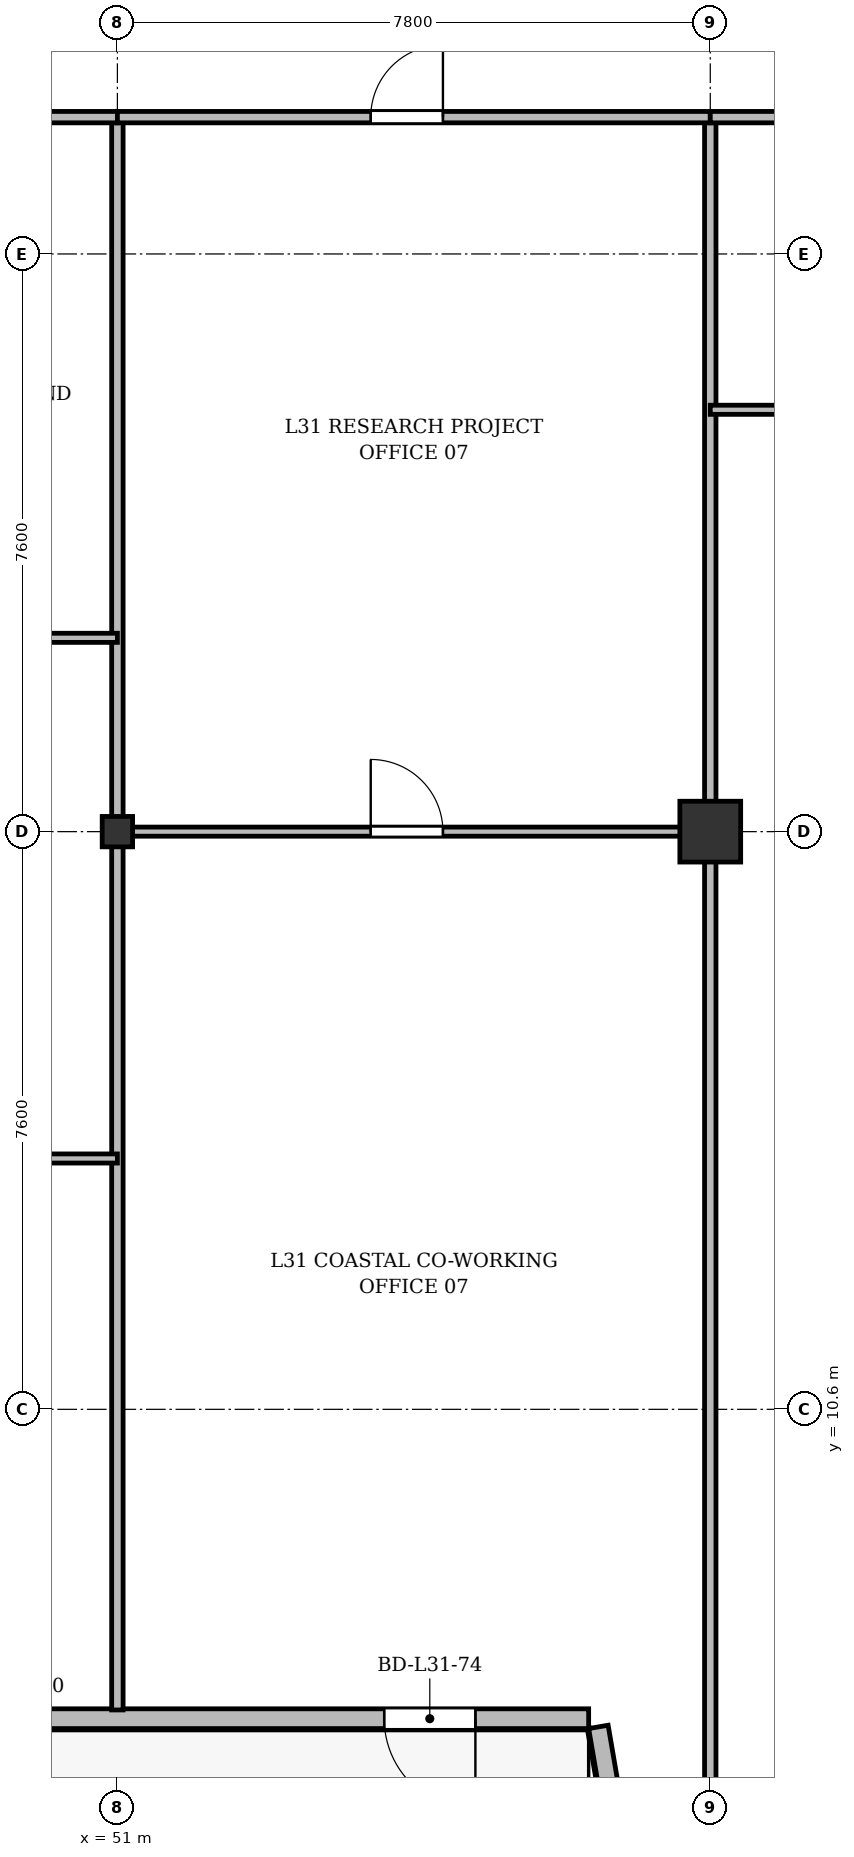
"""IFC4 building model, lengths in metres.
Left out: names, types, materials, properties, quantities, classifications, styles, units other than length and angle.
Written with IfcOpenShell. Run it as: python <this file> out.ifc"""

import sys

from ifc_helpers import new_model, si_unit, direction, frame, frame_2d, origin, origin_2d, place, context, subcontext, project, spatial, rectangle, i_section, extrude, source, transform, mapped, element, fill, save


model = new_model("IFC4")
c1 = context("Model", 3, precision=1e-05, world=origin(), true_north=direction((0.0, 1.0)))
c2 = subcontext(c1, "Body", "Model", "MODEL_VIEW")
j1 = project(units=[si_unit("LENGTHUNIT", "METRE"), si_unit("PLANEANGLEUNIT", "RADIAN")], contexts=[c1])
p1 = place(None, origin())
s1 = spatial("IfcSite", under=j1, at=p1, CompositionType="ELEMENT")
p2 = place(p1, origin())
s2 = spatial("IfcBuilding", under=s1, at=p2, CompositionType="ELEMENT")
p3 = place(p2, frame((0.0, 0.0, 121.3)))
s3 = spatial("IfcBuildingStorey", under=s2, at=p3, CompositionType="ELEMENT", Elevation=121.3)
m1 = source(origin(), c2, "Body", "SweptSolid", [
    extrude(i_section(OverallWidth=0.4, OverallDepth=0.4, WebThickness=0.022, FlangeThickness=0.035, at=origin_2d()), origin(), (0.0, 0.0, 1.0), 3.6),
])
p4 = place(p3, frame((51.0, 18.2, 0.0), z_axis=(0.0, 0.0, 1.0), x_axis=(1.0, 0.0, 0.0)))
e1 = element("IfcColumn", 1, at=p4, inside=s3, PredefinedType="COLUMN", context=c2, shape_type="MappedRepresentation", body=[
    mapped(m1, transform((0.0, 0.0, 0.0), x_axis=(1.0, 0.0, 0.0), y_axis=(0.0, 1.0, 0.0), z_axis=(0.0, 0.0, 1.0), scale=1.0)),
])
m2 = source(origin(), c2, "Body", "SweptSolid", [
    extrude(rectangle(XDim=0.8, YDim=0.8, at=origin_2d()), origin(), (0.0, 0.0, 1.0), 3.6),
])
p5 = place(p3, frame((58.8, 18.2, 0.0), z_axis=(0.0, 0.0, 1.0), x_axis=(1.0, 0.0, 0.0)))
e2 = element("IfcColumn", 2, at=p5, inside=s3, PredefinedType="COLUMN", context=c2, shape_type="MappedRepresentation", body=[
    mapped(m2, transform((0.0, 0.0, 0.0), x_axis=(1.0, 0.0, 0.0), y_axis=(0.0, 1.0, 0.0), z_axis=(0.0, 0.0, 1.0), scale=1.0)),
])
p6 = place(p3, frame((57.928, 2.922, 0.0), z_axis=(0.0, 0.0, 1.0), x_axis=(-0.168923741424, 0.98562912375, 0.0)))
e3 = element("IfcWall", 3, at=p6, inside=s3, PredefinedType="SOLIDWALL", context=c2, shape_type="SweptSolid", body=[
    extrude(rectangle(XDim=3.551, YDim=0.26, at=frame_2d((1.775, 0.0))), origin(), (0.0, 0.0, 1.0), 2.752),
])
p7 = place(p3, frame((57.2, 6.53, 0.0), z_axis=(0.0, 0.0, 1.0), x_axis=(-1.0, 0.0, 0.0)))
e4 = element("IfcWall", 4, at=p7, inside=s3, PredefinedType="SOLIDWALL", context=c2, shape_type="SweptSolid", body=[
    extrude(rectangle(XDim=11.8, YDim=0.26, at=frame_2d((5.9, 0.0))), origin(), (0.0, 0.0, 1.0), 2.84),
])
p8 = place(p7, frame((1.49, 0.0, 0.0)))
e5 = element("IfcOpeningElement", 5, at=p8, cuts=e4, PredefinedType="OPENING", context=c2, shape_type="SweptSolid", body=[
    extrude(rectangle(XDim=1.2, YDim=2.2, at=frame_2d((0.6, 1.1))), frame((0.0, 0.14, 0.0), z_axis=(0.0, -1.0, 0.0), x_axis=(1.0, 0.0, 0.0)), (0.0, 0.0, 1.0), 0.28),
])
p9 = place(p7, frame((7.25, 0.0, 0.9)))
e6 = element("IfcOpeningElement", 6, at=p9, cuts=e4, PredefinedType="OPENING", context=c2, shape_type="SweptSolid", body=[
    extrude(rectangle(XDim=1.5, YDim=1.75, at=frame_2d((0.75, 0.875))), frame((0.0, 0.14, 0.0), z_axis=(0.0, -1.0, 0.0), x_axis=(1.0, 0.0, 0.0)), (0.0, 0.0, 1.0), 0.28),
])
p10 = place(p7, frame((10.005, 0.0, 0.9)))
e7 = element("IfcOpeningElement", 7, at=p10, cuts=e4, PredefinedType="OPENING", context=c2, shape_type="SweptSolid", body=[
    extrude(rectangle(XDim=1.5, YDim=1.75, at=frame_2d((0.75, 0.875))), frame((0.0, 0.14, 0.0), z_axis=(0.0, -1.0, 0.0), x_axis=(1.0, 0.0, 0.0)), (0.0, 0.0, 1.0), 0.28),
])
p11 = place(p3, frame((51.0, 6.645, 0.0), z_axis=(0.0, 0.0, 1.0), x_axis=(0.0, 1.0, 0.0)))
e8 = element("IfcWall", 8, at=p11, inside=s3, PredefinedType="PARTITIONING", context=c2, shape_type="SweptSolid", body=[
    extrude(rectangle(XDim=20.955, YDim=0.15, at=frame_2d((10.478, 0.0))), origin(), (0.0, 0.0, 1.0), 2.84),
])
p12 = place(p3, frame((58.8, 3.145, 0.0), z_axis=(0.0, 0.0, 1.0), x_axis=(0.0, 1.0, 0.0)))
e9 = element("IfcWall", 9, at=p12, inside=s3, PredefinedType="PARTITIONING", context=c2, shape_type="SweptSolid", body=[
    extrude(rectangle(XDim=24.455, YDim=0.15, at=frame_2d((12.228, 0.0))), origin(), (0.0, 0.0, 1.0), 2.84),
])
p13 = place(p3, frame((43.8, 20.75, 0.0), z_axis=(0.0, 0.0, 1.0), x_axis=(1.0, 0.0, 0.0)))
e10 = element("IfcWall", 10, at=p13, inside=s3, PredefinedType="PARTITIONING", context=c2, shape_type="SweptSolid", body=[
    extrude(rectangle(XDim=7.2, YDim=0.12, at=frame_2d((3.6, 0.0))), origin(), (0.0, 0.0, 1.0), 2.84),
])
p14 = place(p13, frame((3.125, 0.0, 0.0)))
e11 = element("IfcOpeningElement", 11, at=p14, cuts=e10, PredefinedType="OPENING", context=c2, shape_type="SweptSolid", body=[
    extrude(rectangle(XDim=0.95, YDim=2.15, at=frame_2d((0.475, 1.075))), frame((0.0, 0.07, 0.0), z_axis=(0.0, -1.0, 0.0), x_axis=(1.0, 0.0, 0.0)), (0.0, 0.0, 1.0), 0.14),
])
p15 = place(p3, frame((43.8, 27.6, 0.0), z_axis=(0.0, 0.0, 1.0), x_axis=(1.0, 0.0, 0.0)))
e12 = element("IfcWall", 12, at=p15, inside=s3, PredefinedType="PARTITIONING", context=c2, shape_type="SweptSolid", body=[
    extrude(rectangle(XDim=7.2, YDim=0.15, at=frame_2d((3.6, 0.0))), origin(), (0.0, 0.0, 1.0), 2.84),
])
p16 = place(p15, frame((4.706, 0.0, 0.0)))
e13 = element("IfcOpeningElement", 13, at=p16, cuts=e12, PredefinedType="OPENING", context=c2, shape_type="SweptSolid", body=[
    extrude(rectangle(XDim=0.95, YDim=2.15, at=frame_2d((0.475, 1.075))), frame((0.0, 0.085, 0.0), z_axis=(0.0, -1.0, 0.0), x_axis=(1.0, 0.0, 0.0)), (0.0, 0.0, 1.0), 0.17),
])
p17 = place(p3, frame((47.4, 13.9, 0.0), z_axis=(0.0, 0.0, 1.0), x_axis=(1.0, 0.0, 0.0)))
e14 = element("IfcWall", 14, at=p17, inside=s3, PredefinedType="PARTITIONING", context=c2, shape_type="SweptSolid", body=[
    extrude(rectangle(XDim=3.6, YDim=0.12, at=frame_2d((1.8, 0.0))), origin(), (0.0, 0.0, 1.0), 2.84),
])
p18 = place(p17, frame((1.325, 0.0, 0.0)))
e15 = element("IfcOpeningElement", 15, at=p18, cuts=e14, PredefinedType="OPENING", context=c2, shape_type="SweptSolid", body=[
    extrude(rectangle(XDim=0.95, YDim=2.15, at=frame_2d((0.475, 1.075))), frame((0.0, 0.07, 0.0), z_axis=(0.0, -1.0, 0.0), x_axis=(1.0, 0.0, 0.0)), (0.0, 0.0, 1.0), 0.14),
])
p19 = place(p3, frame((51.0, 27.6, 0.0), z_axis=(0.0, 0.0, 1.0), x_axis=(1.0, 0.0, 0.0)))
e16 = element("IfcWall", 16, at=p19, inside=s3, PredefinedType="PARTITIONING", context=c2, shape_type="SweptSolid", body=[
    extrude(rectangle(XDim=7.8, YDim=0.15, at=frame_2d((3.9, 0.0))), origin(), (0.0, 0.0, 1.0), 2.84),
])
p20 = place(p19, frame((3.333, 0.0, 0.0)))
e17 = element("IfcOpeningElement", 17, at=p20, cuts=e16, PredefinedType="OPENING", context=c2, shape_type="SweptSolid", body=[
    extrude(rectangle(XDim=0.95, YDim=2.15, at=frame_2d((0.475, 1.075))), frame((0.0, 0.085, 0.0), z_axis=(0.0, -1.0, 0.0), x_axis=(1.0, 0.0, 0.0)), (0.0, 0.0, 1.0), 0.17),
])
p21 = place(p3, frame((51.0, 18.2, 0.0), z_axis=(0.0, 0.0, 1.0), x_axis=(1.0, 0.0, 0.0)))
e18 = element("IfcWall", 18, at=p21, inside=s3, PredefinedType="PARTITIONING", context=c2, shape_type="SweptSolid", body=[
    extrude(rectangle(XDim=7.8, YDim=0.12, at=frame_2d((3.9, 0.0))), origin(), (0.0, 0.0, 1.0), 2.752),
])
p22 = place(p21, frame((3.333, 0.0, 0.0)))
e19 = element("IfcOpeningElement", 19, at=p22, cuts=e18, PredefinedType="OPENING", context=c2, shape_type="SweptSolid", body=[
    extrude(rectangle(XDim=0.95, YDim=2.15, at=frame_2d((0.475, 1.075))), frame((0.0, 0.07, 0.0), z_axis=(0.0, -1.0, 0.0), x_axis=(1.0, 0.0, 0.0)), (0.0, 0.0, 1.0), 0.14),
])
p23 = place(p3, frame((58.8, 27.6, 0.0), z_axis=(0.0, 0.0, 1.0), x_axis=(1.0, 0.0, 0.0)))
e20 = element("IfcWall", 20, at=p23, inside=s3, PredefinedType="PARTITIONING", context=c2, shape_type="SweptSolid", body=[
    extrude(rectangle(XDim=6.8, YDim=0.15, at=frame_2d((3.4, 0.0))), origin(), (0.0, 0.0, 1.0), 2.84),
])
p24 = place(p23, frame((2.925, 0.0, 0.0)))
e21 = element("IfcOpeningElement", 21, at=p24, cuts=e20, PredefinedType="OPENING", context=c2, shape_type="SweptSolid", body=[
    extrude(rectangle(XDim=0.95, YDim=2.15, at=frame_2d((0.475, 1.075))), frame((0.0, 0.085, 0.0), z_axis=(0.0, -1.0, 0.0), x_axis=(1.0, 0.0, 0.0)), (0.0, 0.0, 1.0), 0.17),
])
p25 = place(p3, frame((58.8, 23.75, 0.0), z_axis=(0.0, 0.0, 1.0), x_axis=(1.0, 0.0, 0.0)))
e22 = element("IfcWall", 22, at=p25, inside=s3, PredefinedType="PARTITIONING", context=c2, shape_type="SweptSolid", body=[
    extrude(rectangle(XDim=6.8, YDim=0.12, at=frame_2d((3.4, 0.0))), origin(), (0.0, 0.0, 1.0), 2.84),
])
p26 = place(p25, frame((2.925, 0.0, 0.0)))
e23 = element("IfcOpeningElement", 23, at=p26, cuts=e22, PredefinedType="OPENING", context=c2, shape_type="SweptSolid", body=[
    extrude(rectangle(XDim=0.95, YDim=2.15, at=frame_2d((0.475, 1.075))), frame((0.0, 0.07, 0.0), z_axis=(0.0, -1.0, 0.0), x_axis=(1.0, 0.0, 0.0)), (0.0, 0.0, 1.0), 0.14),
])
m3 = source(origin(), c2, "Body", "SweptSolid", [
    extrude(rectangle(XDim=1.2, YDim=2.2, at=frame_2d((0.6, 1.1))), frame((0.0, 0.025, 0.0), z_axis=(0.0, -1.0, 0.0), x_axis=(1.0, 0.0, 0.0)), (0.0, 0.0, 1.0), 0.05),
])
p27 = place(p8, origin())
e24 = element("IfcDoor", 24, at=p27, inside=s3, OperationType="SINGLE_SWING_LEFT", PredefinedType="DOOR", context=c2, shape_type="MappedRepresentation", body=[
    mapped(m3, transform((0.0, 0.0, 0.0), x_axis=(1.0, 0.0, 0.0), y_axis=(0.0, 1.0, 0.0), z_axis=(0.0, 0.0, 1.0), scale=1.0)),
])
fill(e5, e24)
m4 = source(origin(), c2, "Body", "SweptSolid", [
    extrude(rectangle(XDim=0.95, YDim=2.15, at=frame_2d((0.475, 1.075))), frame((0.0, 0.025, 0.0), z_axis=(0.0, -1.0, 0.0), x_axis=(1.0, 0.0, 0.0)), (0.0, 0.0, 1.0), 0.05),
])
p28 = place(p20, origin())
e25 = element("IfcDoor", 25, at=p28, inside=s3, OperationType="SINGLE_SWING_RIGHT", PredefinedType="DOOR", context=c2, shape_type="MappedRepresentation", body=[
    mapped(m4, transform((0.0, 0.0, 0.0), x_axis=(1.0, 0.0, 0.0), y_axis=(0.0, 1.0, 0.0), z_axis=(0.0, 0.0, 1.0), scale=1.0)),
])
fill(e17, e25)
p29 = place(p22, origin())
e26 = element("IfcDoor", 26, at=p29, inside=s3, OperationType="SINGLE_SWING_LEFT", PredefinedType="DOOR", context=c2, shape_type="MappedRepresentation", body=[
    mapped(m4, transform((0.0, 0.0, 0.0), x_axis=(1.0, 0.0, 0.0), y_axis=(0.0, 1.0, 0.0), z_axis=(0.0, 0.0, 1.0), scale=1.0)),
])
fill(e19, e26)
save(model, sys.argv[1])
